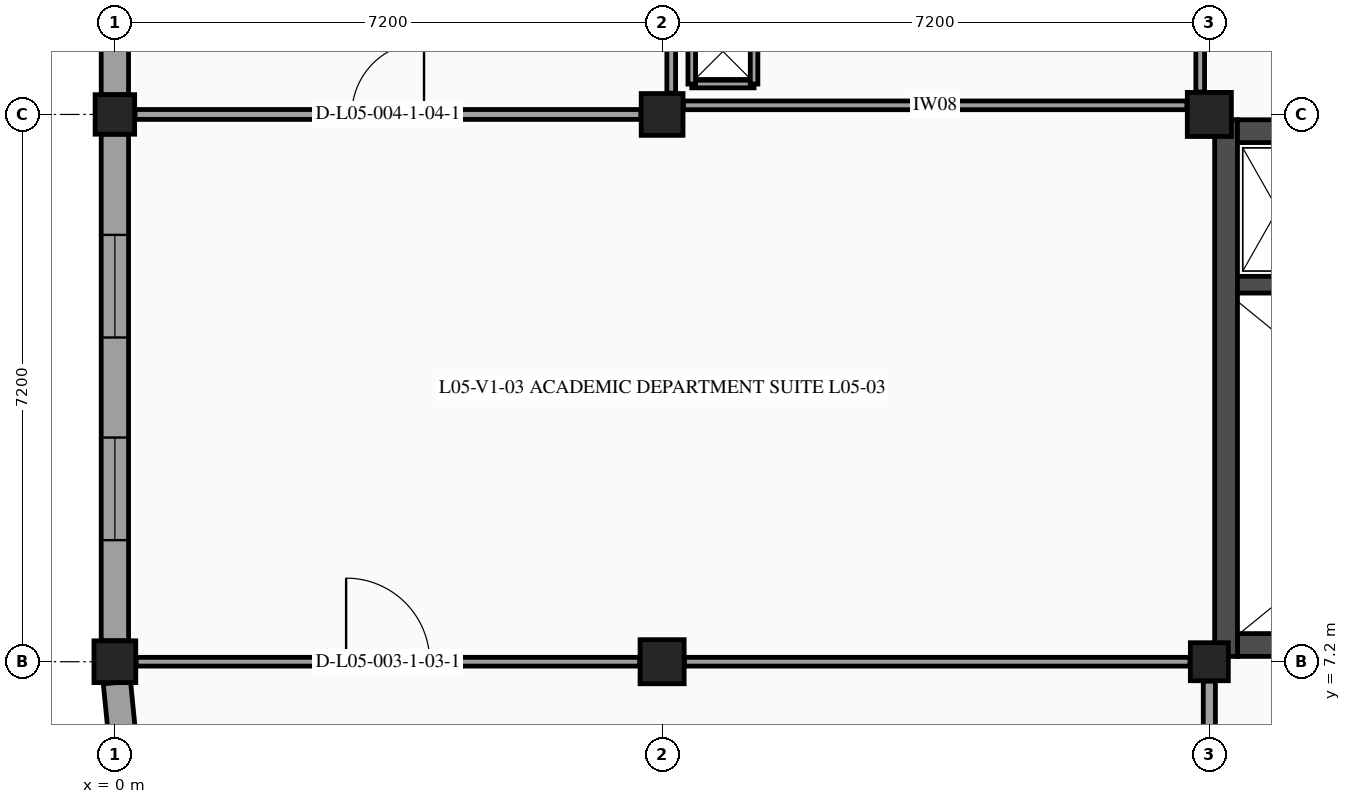
"""IFC4 building model, lengths in metres.
Left out: names, types, materials, properties, quantities, classifications, styles, units other than length and angle.
Written with IfcOpenShell. Run it as: python <this file> out.ifc"""

import sys

from ifc_helpers import new_model, si_unit, direction, frame, frame_2d, origin, origin_2d, place, context, subcontext, project, spatial, rectangle, extrude, element, fill, save


model = new_model("IFC4")
c1 = context("Model", 3, precision=1e-05, world=origin(), true_north=direction((0.0, 1.0)))
c2 = subcontext(c1, "Body", "Model", "MODEL_VIEW")
j1 = project(units=[si_unit("LENGTHUNIT", "METRE"), si_unit("PLANEANGLEUNIT", "RADIAN")], contexts=[c1])
p1 = place(None, origin())
s1 = spatial("IfcSite", under=j1, at=p1, CompositionType="ELEMENT")
p2 = place(p1, origin())
s2 = spatial("IfcBuilding", under=s1, at=p2, CompositionType="ELEMENT")
p3 = place(p2, frame((0.0, 0.0, 22.8)))
s3 = spatial("IfcBuildingStorey", under=s2, at=p3, CompositionType="ELEMENT", Elevation=22.8)
p4 = place(p3, frame((0.0, 7.2, 0.0), z_axis=(0.0, 0.0, 1.0), x_axis=(1.0, 0.0, 0.0)))
e1 = element("IfcColumn", 1, at=p4, inside=s3, PredefinedType="COLUMN", context=c2, shape_type="SweptSolid", body=[
    extrude(rectangle(XDim=0.55, YDim=0.55, at=origin_2d()), origin(), (0.0, 0.0, 1.0), 3.9),
])
p5 = place(p3, frame((0.0, 14.4, 0.0), z_axis=(0.0, 0.0, 1.0), x_axis=(1.0, 0.0, 0.0)))
e2 = element("IfcColumn", 2, at=p5, inside=s3, PredefinedType="COLUMN", context=c2, shape_type="SweptSolid", body=[
    extrude(rectangle(XDim=0.52, YDim=0.52, at=origin_2d()), origin(), (0.0, 0.0, 1.0), 3.9),
])
p6 = place(p3, frame((7.2, 7.2, 0.0), z_axis=(0.0, 0.0, 1.0), x_axis=(1.0, 0.0, 0.0)))
e3 = element("IfcColumn", 3, at=p6, inside=s3, PredefinedType="COLUMN", context=c2, shape_type="SweptSolid", body=[
    extrude(rectangle(XDim=0.58, YDim=0.58, at=origin_2d()), origin(), (0.0, 0.0, 1.0), 3.9),
])
p7 = place(p3, frame((7.2, 14.4, 0.0), z_axis=(0.0, 0.0, 1.0), x_axis=(1.0, 0.0, 0.0)))
e4 = element("IfcColumn", 4, at=p7, inside=s3, PredefinedType="COLUMN", context=c2, shape_type="SweptSolid", body=[
    extrude(rectangle(XDim=0.55, YDim=0.55, at=origin_2d()), origin(), (0.0, 0.0, 1.0), 3.9),
])
p8 = place(p3, frame((14.4, 7.2, 0.0), z_axis=(0.0, 0.0, 1.0), x_axis=(1.0, 0.0, 0.0)))
e5 = element("IfcColumn", 5, at=p8, inside=s3, PredefinedType="COLUMN", context=c2, shape_type="SweptSolid", body=[
    extrude(rectangle(XDim=0.5, YDim=0.5, at=origin_2d()), origin(), (0.0, 0.0, 1.0), 3.9),
])
p9 = place(p3, frame((14.4, 14.4, 0.0), z_axis=(0.0, 0.0, 1.0), x_axis=(1.0, 0.0, 0.0)))
e6 = element("IfcColumn", 6, at=p9, inside=s3, PredefinedType="COLUMN", context=c2, shape_type="SweptSolid", body=[
    extrude(rectangle(XDim=0.58, YDim=0.58, at=origin_2d()), origin(), (0.0, 0.0, 1.0), 3.9),
])
p10 = place(p3, frame((0.138, 5.795, 0.0), z_axis=(0.0, 0.0, 1.0), x_axis=(-0.098184772956, 0.995168202044, 0.0)))
e7 = element("IfcWall", 7, at=p10, inside=s3, PredefinedType="STANDARD", context=c2, shape_type="SweptSolid", body=[
    extrude(rectangle(XDim=1.136, YDim=0.36, at=frame_2d((0.568, 0.0))), origin(), (0.0, 0.0, 1.0), 3.67),
])
p11 = place(p3, frame((0.0, 7.475, 0.0), z_axis=(0.0, 0.0, 1.0), x_axis=(0.0, 1.0, 0.0)))
e8 = element("IfcWall", 8, at=p11, inside=s3, PredefinedType="STANDARD", context=c2, shape_type="SweptSolid", body=[
    extrude(rectangle(XDim=6.665, YDim=0.36, at=frame_2d((3.333, 0.0))), origin(), (0.0, 0.0, 1.0), 2.865),
])
p12 = place(p11, frame((1.324, 0.0, 1.15)))
e9 = element("IfcOpeningElement", 9, at=p12, cuts=e8, PredefinedType="OPENING", context=c2, shape_type="SweptSolid", body=[
    extrude(rectangle(XDim=1.35, YDim=1.1, at=frame_2d((0.675, 0.55))), frame((0.0, 0.19, 0.0), z_axis=(0.0, -1.0, 0.0), x_axis=(1.0, 0.0, 0.0)), (0.0, 0.0, 1.0), 0.38),
])
p13 = place(p11, frame((3.99, 0.0, 1.15)))
e10 = element("IfcOpeningElement", 10, at=p13, cuts=e8, PredefinedType="OPENING", context=c2, shape_type="SweptSolid", body=[
    extrude(rectangle(XDim=1.35, YDim=1.1, at=frame_2d((0.675, 0.55))), frame((0.0, 0.19, 0.0), z_axis=(0.0, -1.0, 0.0), x_axis=(1.0, 0.0, 0.0)), (0.0, 0.0, 1.0), 0.38),
])
p14 = place(p3, frame((0.0, 14.66, 0.0), z_axis=(0.0, 0.0, 1.0), x_axis=(0.0, 1.0, 0.0)))
e11 = element("IfcWall", 11, at=p14, inside=s3, PredefinedType="STANDARD", context=c2, shape_type="SweptSolid", body=[
    extrude(rectangle(XDim=6.69, YDim=0.36, at=frame_2d((3.345, 0.0))), origin(), (0.0, 0.0, 1.0), 2.865),
])
p15 = place(p14, frame((1.607, 0.0, 1.15)))
e12 = element("IfcOpeningElement", 12, at=p15, cuts=e11, PredefinedType="OPENING", context=c2, shape_type="SweptSolid", body=[
    extrude(rectangle(XDim=0.8, YDim=1.5, at=frame_2d((0.4, 0.75))), frame((0.0, 0.19, 0.0), z_axis=(0.0, -1.0, 0.0), x_axis=(1.0, 0.0, 0.0)), (0.0, 0.0, 1.0), 0.38),
])
p16 = place(p14, frame((4.283, 0.0, 1.15)))
e13 = element("IfcOpeningElement", 13, at=p16, cuts=e11, PredefinedType="OPENING", context=c2, shape_type="SweptSolid", body=[
    extrude(rectangle(XDim=0.8, YDim=1.5, at=frame_2d((0.4, 0.75))), frame((0.0, 0.19, 0.0), z_axis=(0.0, -1.0, 0.0), x_axis=(1.0, 0.0, 0.0)), (0.0, 0.0, 1.0), 0.38),
])
p17 = place(p3, frame((14.77, 7.42, 0.0), z_axis=(0.0, 0.0, 1.0), x_axis=(1.0, 0.0, 0.0)))
e14 = element("IfcWall", 14, at=p17, inside=s3, PredefinedType="SHEAR", context=c2, shape_type="SweptSolid", body=[
    extrude(rectangle(XDim=6.68, YDim=0.3, at=frame_2d((3.34, 0.0))), origin(), (0.0, 0.0, 1.0), 3.67),
])
p18 = place(p3, frame((14.62, 14.33, 0.0), z_axis=(0.0, 0.0, 1.0), x_axis=(0.0, -1.0, 0.0)))
e15 = element("IfcWall", 15, at=p18, inside=s3, PredefinedType="SHEAR", context=c2, shape_type="SweptSolid", body=[
    extrude(rectangle(XDim=7.06, YDim=0.3, at=frame_2d((3.53, 0.0))), origin(), (0.0, 0.0, 1.0), 3.67),
])
p19 = place(p3, frame((14.77, 14.18, 0.0), z_axis=(0.0, 0.0, 1.0), x_axis=(1.0, 0.0, 0.0)))
e16 = element("IfcWall", 16, at=p19, inside=s3, PredefinedType="SHEAR", context=c2, shape_type="SweptSolid", body=[
    extrude(rectangle(XDim=6.68, YDim=0.3, at=frame_2d((3.34, 0.0))), origin(), (0.0, 0.0, 1.0), 3.67),
])
p20 = place(p19, frame((1.42, 0.0, 0.0)))
e17 = element("IfcOpeningElement", 17, at=p20, cuts=e16, PredefinedType="OPENING", context=c2, shape_type="SweptSolid", body=[
    extrude(rectangle(XDim=0.85, YDim=2.1, at=frame_2d((0.425, 1.05))), frame((0.0, 0.16, 0.0), z_axis=(0.0, -1.0, 0.0), x_axis=(1.0, 0.0, 0.0)), (0.0, 0.0, 1.0), 0.32),
])
p21 = place(p19, frame((3.4, 0.0, 0.0)))
e18 = element("IfcOpeningElement", 18, at=p21, cuts=e16, PredefinedType="OPENING", context=c2, shape_type="SweptSolid", body=[
    extrude(rectangle(XDim=0.95, YDim=2.15, at=frame_2d((0.475, 1.075))), frame((0.0, 0.16, 0.0), z_axis=(0.0, -1.0, 0.0), x_axis=(1.0, 0.0, 0.0)), (0.0, 0.0, 1.0), 0.32),
])
p22 = place(p3, frame((14.77, 12.16, 0.0), z_axis=(0.0, 0.0, 1.0), x_axis=(1.0, 0.0, 0.0)))
e19 = element("IfcWall", 19, at=p22, inside=s3, PredefinedType="SHEAR", context=c2, shape_type="SweptSolid", body=[
    extrude(rectangle(XDim=6.68, YDim=0.22, at=frame_2d((3.34, 0.0))), origin(), (0.0, 0.0, 1.0), 3.67),
])
p23 = place(p3, frame((7.48, 14.52, 0.0), z_axis=(0.0, 0.0, 1.0), x_axis=(1.0, 0.0, 0.0)))
e20 = element("IfcWall", 20, at=p23, inside=s3, PredefinedType="PARTITIONING", context=c2, shape_type="SweptSolid", body=[
    extrude(rectangle(XDim=6.625, YDim=0.115, at=frame_2d((3.312, 0.0))), origin(), (0.0, 0.0, 1.0), 3.01),
])
p24 = place(p3, frame((7.32, 14.68, 0.0), z_axis=(0.0, 0.0, 1.0), x_axis=(0.0, 1.0, 0.0)))
e21 = element("IfcWall", 21, at=p24, inside=s3, PredefinedType="PARTITIONING", context=c2, shape_type="SweptSolid", body=[
    extrude(rectangle(XDim=6.655, YDim=0.115, at=frame_2d((3.328, 0.0))), origin(), (0.0, 0.0, 1.0), 3.035),
])
p25 = place(p3, frame((14.28, 14.695, 0.0), z_axis=(0.0, 0.0, 1.0), x_axis=(0.0, 1.0, 0.0)))
e22 = element("IfcWall", 22, at=p25, inside=s3, PredefinedType="PARTITIONING", context=c2, shape_type="SweptSolid", body=[
    extrude(rectangle(XDim=6.625, YDim=0.115, at=frame_2d((3.312, 0.0))), origin(), (0.0, 0.0, 1.0), 3.035),
])
p26 = place(p25, frame((0.705, 0.0, 0.0)))
e23 = element("IfcOpeningElement", 23, at=p26, cuts=e22, PredefinedType="OPENING", context=c2, shape_type="SweptSolid", body=[
    extrude(rectangle(XDim=0.95, YDim=2.1, at=frame_2d((0.475, 1.05))), frame((0.0, 0.067, 0.0), z_axis=(0.0, -1.0, 0.0), x_axis=(1.0, 0.0, 0.0)), (0.0, 0.0, 1.0), 0.135),
])
p27 = place(p25, frame((2.805, 0.0, 0.0)))
e24 = element("IfcOpeningElement", 24, at=p27, cuts=e22, PredefinedType="OPENING", context=c2, shape_type="SweptSolid", body=[
    extrude(rectangle(XDim=0.95, YDim=2.1, at=frame_2d((0.475, 1.05))), frame((0.0, 0.067, 0.0), z_axis=(0.0, -1.0, 0.0), x_axis=(1.0, 0.0, 0.0)), (0.0, 0.0, 1.0), 0.135),
])
p28 = place(p25, frame((4.955, 0.0, 0.0)))
e25 = element("IfcOpeningElement", 25, at=p28, cuts=e22, PredefinedType="OPENING", context=c2, shape_type="SweptSolid", body=[
    extrude(rectangle(XDim=1.0, YDim=2.15, at=frame_2d((0.5, 1.075))), frame((0.0, 0.067, 0.0), z_axis=(0.0, -1.0, 0.0), x_axis=(1.0, 0.0, 0.0)), (0.0, 0.0, 1.0), 0.135),
])
p29 = place(p3, frame((7.59, 14.8, 0.0), z_axis=(0.0, 0.0, 1.0), x_axis=(1.0, 0.0, 0.0)))
e26 = element("IfcWall", 26, at=p29, inside=s3, PredefinedType="PARTITIONING", context=c2, shape_type="SweptSolid", body=[
    extrude(rectangle(XDim=0.82, YDim=0.1, at=frame_2d((0.41, 0.0))), origin(), (0.0, 0.0, 1.0), 3.67),
])
for number, where, z_axis, x_axis in (
    (27, (8.41, 14.8, 0.0), (0.0, 0.0, 1.0), (0.0, 1.0, 0.0)),
    (28, (7.59, 15.66, 0.0), (0.0, 0.0, 1.0), (0.0, -1.0, 0.0)),
):
    element("IfcWall", number, at=place(p3, frame(where, z_axis=z_axis, x_axis=x_axis)), inside=s3, PredefinedType="PARTITIONING", context=c2, shape_type="SweptSolid", body=[
        extrude(rectangle(XDim=0.86, YDim=0.1, at=frame_2d((0.43, 0.0))), origin(), (0.0, 0.0, 1.0), 3.67),
    ])
p30 = place(p3, frame((0.28, 7.2, 0.0), z_axis=(0.0, 0.0, 1.0), x_axis=(1.0, 0.0, 0.0)))
e29 = element("IfcWall", 29, at=p30, inside=s3, PredefinedType="PARTITIONING", context=c2, shape_type="SweptSolid", body=[
    extrude(rectangle(XDim=6.625, YDim=0.115, at=frame_2d((3.312, 0.0))), origin(), (0.0, 0.0, 1.0), 2.97),
])
p31 = place(p30, frame((2.762, 0.0, 0.0)))
e30 = element("IfcOpeningElement", 30, at=p31, cuts=e29, PredefinedType="OPENING", context=c2, shape_type="SweptSolid", body=[
    extrude(rectangle(XDim=1.1, YDim=2.15, at=frame_2d((0.55, 1.075))), frame((0.0, 0.067, 0.0), z_axis=(0.0, -1.0, 0.0), x_axis=(1.0, 0.0, 0.0)), (0.0, 0.0, 1.0), 0.135),
])
p32 = place(p3, frame((0.265, 14.4, 0.0), z_axis=(0.0, 0.0, 1.0), x_axis=(1.0, 0.0, 0.0)))
e31 = element("IfcWall", 31, at=p32, inside=s3, PredefinedType="PARTITIONING", context=c2, shape_type="SweptSolid", body=[
    extrude(rectangle(XDim=6.655, YDim=0.13, at=frame_2d((3.328, 0.0))), origin(), (0.0, 0.0, 1.0), 2.97),
])
p33 = place(p32, frame((2.853, 0.0, 0.0)))
e32 = element("IfcOpeningElement", 32, at=p33, cuts=e31, PredefinedType="OPENING", context=c2, shape_type="SweptSolid", body=[
    extrude(rectangle(XDim=0.95, YDim=2.15, at=frame_2d((0.475, 1.075))), frame((0.0, 0.075, 0.0), z_axis=(0.0, -1.0, 0.0), x_axis=(1.0, 0.0, 0.0)), (0.0, 0.0, 1.0), 0.15),
])
p34 = place(p3, frame((14.4, 0.265, 0.0), z_axis=(0.0, 0.0, 1.0), x_axis=(0.0, 1.0, 0.0)))
e33 = element("IfcWall", 33, at=p34, inside=s3, PredefinedType="PARTITIONING", context=c2, shape_type="SweptSolid", body=[
    extrude(rectangle(XDim=6.68, YDim=0.16, at=frame_2d((3.34, 0.0))), origin(), (0.0, 0.0, 1.0), 2.975),
])
p35 = place(p34, frame((2.6, 0.0, 0.0)))
e34 = element("IfcOpeningElement", 34, at=p35, cuts=e33, PredefinedType="OPENING", context=c2, shape_type="SweptSolid", body=[
    extrude(rectangle(XDim=1.48, YDim=2.28, at=frame_2d((0.74, 1.14))), frame((0.0, 0.09, 0.0), z_axis=(0.0, -1.0, 0.0), x_axis=(1.0, 0.0, 0.0)), (0.0, 0.0, 1.0), 0.18),
])
p36 = place(p3, frame((7.495, 7.2, 0.0), z_axis=(0.0, 0.0, 1.0), x_axis=(1.0, 0.0, 0.0)))
e35 = element("IfcWall", 35, at=p36, inside=s3, PredefinedType="PARTITIONING", context=c2, shape_type="SweptSolid", body=[
    extrude(rectangle(XDim=6.65, YDim=0.115, at=frame_2d((3.325, 0.0))), origin(), (0.0, 0.0, 1.0), 3.01),
])
p37 = place(p12, origin())
e36 = element("IfcWindow", 36, at=p37, inside=s3, PartitioningType="SINGLE_PANEL", PredefinedType="WINDOW", context=c2, shape_type="SweptSolid", body=[
    extrude(rectangle(XDim=1.35, YDim=1.1, at=frame_2d((0.675, 0.55))), frame((0.0, -0.08, 0.0), z_axis=(0.0, -1.0, 0.0), x_axis=(1.0, 0.0, 0.0)), (0.0, 0.0, 1.0), 0.06),
])
fill(e9, e36)
p38 = place(p13, origin())
e37 = element("IfcWindow", 37, at=p38, inside=s3, PartitioningType="SINGLE_PANEL", PredefinedType="WINDOW", context=c2, shape_type="SweptSolid", body=[
    extrude(rectangle(XDim=1.35, YDim=1.1, at=frame_2d((0.675, 0.55))), frame((0.0, -0.08, 0.0), z_axis=(0.0, -1.0, 0.0), x_axis=(1.0, 0.0, 0.0)), (0.0, 0.0, 1.0), 0.06),
])
fill(e10, e37)
p39 = place(p31, origin())
e38 = element("IfcDoor", 38, at=p39, inside=s3, OperationType="SINGLE_SWING_LEFT", PredefinedType="DOOR", context=c2, shape_type="SweptSolid", body=[
    extrude(rectangle(XDim=1.1, YDim=2.15, at=frame_2d((0.55, 1.075))), frame((0.0, 0.025, 0.0), z_axis=(0.0, -1.0, 0.0), x_axis=(1.0, 0.0, 0.0)), (0.0, 0.0, 1.0), 0.05),
])
fill(e30, e38)
p40 = place(p33, origin())
e39 = element("IfcDoor", 39, at=p40, inside=s3, OperationType="SINGLE_SWING_RIGHT", PredefinedType="DOOR", context=c2, shape_type="SweptSolid", body=[
    extrude(rectangle(XDim=0.95, YDim=2.15, at=frame_2d((0.475, 1.075))), frame((0.0, 0.025, 0.0), z_axis=(0.0, -1.0, 0.0), x_axis=(1.0, 0.0, 0.0)), (0.0, 0.0, 1.0), 0.05),
])
fill(e32, e39)
save(model, sys.argv[1])
